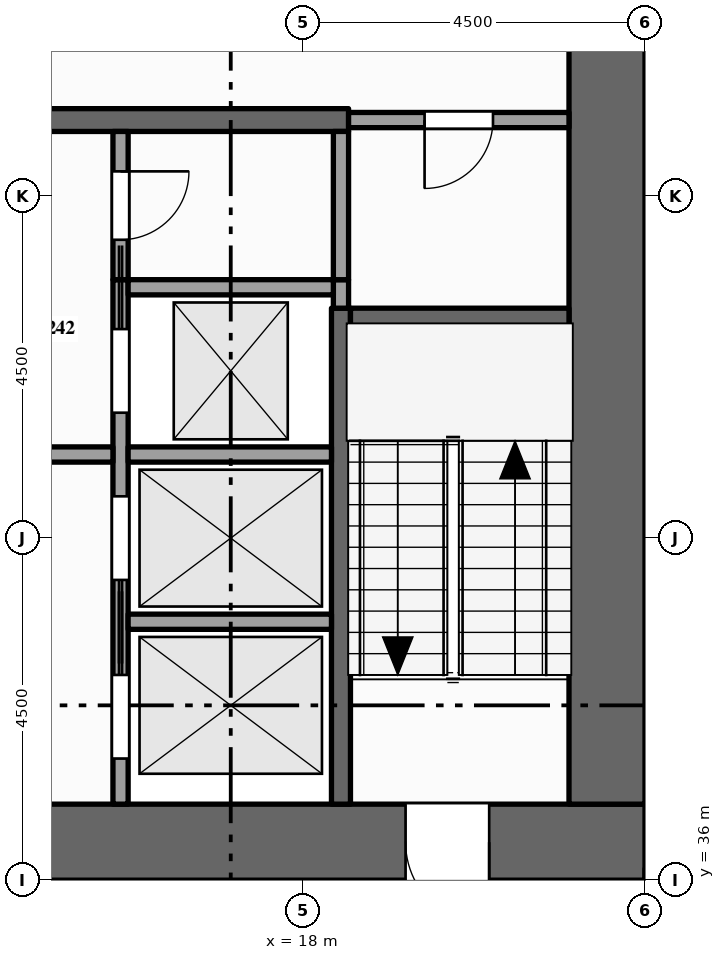
"""IFC4 building model, lengths in metres.
Left out: names, types, materials, properties, quantities, classifications, styles, units other than length and angle.
Written with IfcOpenShell. Run it as: python <this file> out.ifc"""

import sys

from ifc_helpers import new_model, si_unit, direction, frame, frame_2d, origin, place, context, subcontext, project, spatial, rectangle, extrude, element, fill, save


model = new_model("IFC4")
c1 = context("Model", 3, precision=1e-05, world=origin(), true_north=direction((0.0, 1.0)))
c2 = subcontext(c1, "Body", "Model", "MODEL_VIEW")
j1 = project(units=[si_unit("LENGTHUNIT", "METRE"), si_unit("PLANEANGLEUNIT", "RADIAN")], contexts=[c1])
p1 = place(None, origin())
s1 = spatial("IfcSite", under=j1, at=p1, CompositionType="ELEMENT")
p2 = place(p1, origin())
s2 = spatial("IfcBuilding", under=s1, at=p2, CompositionType="ELEMENT")
p3 = place(p2, frame((0.0, 0.0, 235.0)))
s3 = spatial("IfcBuildingStorey", under=s2, at=p3, CompositionType="ELEMENT", Elevation=235.0)
p4 = place(p3, frame((0.0, 36.5, -0.15), z_axis=(0.0, 0.0, 1.0), x_axis=(1.0, 0.0, 0.0)))
e1 = element("IfcWall", 1, at=p4, inside=s3, PredefinedType="SHEAR", context=c2, shape_type="SweptSolid", body=[
    extrude(rectangle(XDim=22.5, YDim=1.0, at=frame_2d((11.25, 0.0))), origin(), (0.0, 0.0, 1.0), 4.0),
])
p5 = place(p4, frame((7.1, 0.0, 0.15)))
e2 = element("IfcOpeningElement", 2, at=p5, cuts=e1, PredefinedType="OPENING", context=c2, shape_type="SweptSolid", body=[
    extrude(rectangle(XDim=1.8, YDim=2.1, at=frame_2d((0.9, 1.05))), frame((0.0, 0.51, 0.0), z_axis=(0.0, -1.0, 0.0), x_axis=(1.0, 0.0, 0.0)), (0.0, 0.0, 1.0), 1.02),
])
p6 = place(p4, frame((13.15, 0.0, 0.15)))
e3 = element("IfcOpeningElement", 3, at=p6, cuts=e1, PredefinedType="OPENING", context=c2, shape_type="SweptSolid", body=[
    extrude(rectangle(XDim=1.1, YDim=2.1, at=frame_2d((0.55, 1.05))), frame((0.0, 0.51, 0.0), z_axis=(0.0, -1.0, 0.0), x_axis=(1.0, 0.0, 0.0)), (0.0, 0.0, 1.0), 1.02),
])
p7 = place(p4, frame((2.15, 0.0, 0.15)))
e4 = element("IfcOpeningElement", 4, at=p7, cuts=e1, PredefinedType="OPENING", context=c2, shape_type="SweptSolid", body=[
    extrude(rectangle(XDim=1.1, YDim=2.1, at=frame_2d((0.55, 1.05))), frame((0.0, 0.51, 0.0), z_axis=(0.0, -1.0, 0.0), x_axis=(1.0, 0.0, 0.0)), (0.0, 0.0, 1.0), 1.02),
])
p8 = place(p4, frame((19.35, 0.0, 0.15)))
e5 = element("IfcOpeningElement", 5, at=p8, cuts=e1, PredefinedType="OPENING", context=c2, shape_type="SweptSolid", body=[
    extrude(rectangle(XDim=1.1, YDim=2.1, at=frame_2d((0.55, 1.05))), frame((0.0, 0.51, 0.0), z_axis=(0.0, -1.0, 0.0), x_axis=(1.0, 0.0, 0.0)), (0.0, 0.0, 1.0), 1.02),
])
p9 = place(p3, frame((22.0, 37.0, -0.15), z_axis=(0.0, 0.0, 1.0), x_axis=(0.0, 1.0, 0.0)))
e6 = element("IfcWall", 6, at=p9, inside=s3, PredefinedType="SHEAR", context=c2, shape_type="SweptSolid", body=[
    extrude(rectangle(XDim=11.5, YDim=1.0, at=frame_2d((5.75, 0.0))), origin(), (0.0, 0.0, 1.0), 4.0),
])
p10 = place(p3, frame((15.6, 37.0, 0.0), z_axis=(0.0, 0.0, 1.0), x_axis=(0.0, 1.0, 0.0)))
e7 = element("IfcWall", 7, at=p10, inside=s3, PredefinedType="SOLIDWALL", context=c2, shape_type="SweptSolid", body=[
    extrude(rectangle(XDim=6.9, YDim=0.2, at=frame_2d((3.45, 0.0))), origin(), (0.0, 0.0, 1.0), 3.85),
])
p11 = place(p10, frame((0.6, 0.0, 0.012)))
e8 = element("IfcOpeningElement", 8, at=p11, cuts=e7, PredefinedType="OPENING", context=c2, shape_type="SweptSolid", body=[
    extrude(rectangle(XDim=1.1, YDim=2.1, at=frame_2d((0.55, 1.05))), frame((0.0, 0.11, 0.0), z_axis=(0.0, -1.0, 0.0), x_axis=(1.0, 0.0, 0.0)), (0.0, 0.0, 1.0), 0.22),
])
p12 = place(p10, frame((2.95, 0.0, 0.012)))
e9 = element("IfcOpeningElement", 9, at=p12, cuts=e7, PredefinedType="OPENING", context=c2, shape_type="SweptSolid", body=[
    extrude(rectangle(XDim=1.1, YDim=2.1, at=frame_2d((0.55, 1.05))), frame((0.0, 0.11, 0.0), z_axis=(0.0, -1.0, 0.0), x_axis=(1.0, 0.0, 0.0)), (0.0, 0.0, 1.0), 0.22),
])
p13 = place(p10, frame((5.15, 0.0, 0.012)))
e10 = element("IfcOpeningElement", 10, at=p13, cuts=e7, PredefinedType="OPENING", context=c2, shape_type="SweptSolid", body=[
    extrude(rectangle(XDim=1.1, YDim=2.1, at=frame_2d((0.55, 1.05))), frame((0.0, 0.11, 0.0), z_axis=(0.0, -1.0, 0.0), x_axis=(1.0, 0.0, 0.0)), (0.0, 0.0, 1.0), 0.22),
])
p14 = place(p3, frame((15.6, 43.9, 0.0), z_axis=(0.0, 0.0, 1.0), x_axis=(0.0, 1.0, 0.0)))
e11 = element("IfcWall", 11, at=p14, inside=s3, PredefinedType="PARTITIONING", context=c2, shape_type="SweptSolid", body=[
    extrude(rectangle(XDim=1.95, YDim=0.2, at=frame_2d((0.975, 0.0))), origin(), (0.0, 0.0, 1.0), 3.85),
])
p15 = place(p14, frame((0.525, 0.0, 0.0)))
e12 = element("IfcOpeningElement", 12, at=p15, cuts=e11, PredefinedType="OPENING", context=c2, shape_type="SweptSolid", body=[
    extrude(rectangle(XDim=0.9, YDim=2.1, at=frame_2d((0.45, 1.05))), frame((0.0, 0.11, 0.0), z_axis=(0.0, -1.0, 0.0), x_axis=(1.0, 0.0, 0.0)), (0.0, 0.0, 1.0), 0.22),
])
p16 = place(p3, frame((18.5, 37.0, 0.0), z_axis=(0.0, 0.0, 1.0), x_axis=(0.0, 1.0, 0.0)))
e13 = element("IfcWall", 13, at=p16, inside=s3, PredefinedType="SHEAR", context=c2, shape_type="SweptSolid", body=[
    extrude(rectangle(XDim=6.525, YDim=0.25, at=frame_2d((3.262, 0.0))), origin(), (0.0, 0.0, 1.0), 3.85),
])
p17 = place(p3, frame((18.5, 43.525, 0.0), z_axis=(0.0, 0.0, 1.0), x_axis=(0.0, 1.0, 0.0)))
e14 = element("IfcWall", 14, at=p17, inside=s3, PredefinedType="SOLIDWALL", context=c2, shape_type="SweptSolid", body=[
    extrude(rectangle(XDim=0.375, YDim=0.2, at=frame_2d((0.188, 0.0))), origin(), (0.0, 0.0, 1.0), 3.85),
])
p18 = place(p3, frame((18.5, 43.9, 0.0), z_axis=(0.0, 0.0, 1.0), x_axis=(0.0, 1.0, 0.0)))
e15 = element("IfcWall", 15, at=p18, inside=s3, PredefinedType="PARTITIONING", context=c2, shape_type="SweptSolid", body=[
    extrude(rectangle(XDim=1.95, YDim=0.2, at=frame_2d((0.975, 0.0))), origin(), (0.0, 0.0, 1.0), 3.85),
])
p19 = place(p3, frame((15.7, 39.4, 0.0), z_axis=(0.0, 0.0, 1.0), x_axis=(1.0, 0.0, 0.0)))
e16 = element("IfcWall", 16, at=p19, inside=s3, PredefinedType="SOLIDWALL", context=c2, shape_type="SweptSolid", body=[
    extrude(rectangle(XDim=2.675, YDim=0.2, at=frame_2d((1.337, 0.0))), origin(), (0.0, 0.0, 1.0), 3.85),
])
p20 = place(p3, frame((11.9, 41.6, 0.0), z_axis=(0.0, 0.0, 1.0), x_axis=(1.0, 0.0, 0.0)))
e17 = element("IfcWall", 17, at=p20, inside=s3, PredefinedType="PARTITIONING", context=c2, shape_type="SweptSolid", body=[
    extrude(rectangle(XDim=3.6, YDim=0.2, at=frame_2d((1.8, 0.0))), origin(), (0.0, 0.0, 1.0), 3.85),
])
p21 = place(p20, frame((1.3, 0.0, 0.0)))
e18 = element("IfcOpeningElement", 18, at=p21, cuts=e17, PredefinedType="OPENING", context=c2, shape_type="SweptSolid", body=[
    extrude(rectangle(XDim=1.0, YDim=2.1, at=frame_2d((0.5, 1.05))), frame((0.0, 0.11, 0.0), z_axis=(0.0, -1.0, 0.0), x_axis=(1.0, 0.0, 0.0)), (0.0, 0.0, 1.0), 0.22),
])
p22 = place(p3, frame((15.7, 41.6, 0.0), z_axis=(0.0, 0.0, 1.0), x_axis=(1.0, 0.0, 0.0)))
e19 = element("IfcWall", 19, at=p22, inside=s3, PredefinedType="SOLIDWALL", context=c2, shape_type="SweptSolid", body=[
    extrude(rectangle(XDim=2.675, YDim=0.2, at=frame_2d((1.337, 0.0))), origin(), (0.0, 0.0, 1.0), 3.85),
])
p23 = place(p3, frame((18.625, 43.4, 0.0), z_axis=(0.0, 0.0, 1.0), x_axis=(1.0, 0.0, 0.0)))
e20 = element("IfcWall", 20, at=p23, inside=s3, PredefinedType="SHEAR", context=c2, shape_type="SweptSolid", body=[
    extrude(rectangle(XDim=2.875, YDim=0.25, at=frame_2d((1.438, 0.0))), origin(), (0.0, 0.0, 1.0), 3.85),
])
p24 = place(p3, frame((15.7, 43.8, 0.0), z_axis=(0.0, 0.0, 1.0), x_axis=(1.0, 0.0, 0.0)))
e21 = element("IfcWall", 21, at=p24, inside=s3, PredefinedType="SOLIDWALL", context=c2, shape_type="SweptSolid", body=[
    extrude(rectangle(XDim=2.7, YDim=0.2, at=frame_2d((1.35, 0.0))), origin(), (0.0, 0.0, 1.0), 3.85),
])
p25 = place(p3, frame((4.1, 46.0, 0.0), z_axis=(0.0, 0.0, 1.0), x_axis=(1.0, 0.0, 0.0)))
e22 = element("IfcWall", 22, at=p25, inside=s3, PredefinedType="SHEAR", context=c2, shape_type="SweptSolid", body=[
    extrude(rectangle(XDim=14.5, YDim=0.3, at=frame_2d((7.25, 0.0))), origin(), (0.0, 0.0, 1.0), 3.85),
])
p26 = place(p25, frame((3.4, 0.0, 0.0)))
e23 = element("IfcOpeningElement", 23, at=p26, cuts=e22, PredefinedType="OPENING", context=c2, shape_type="SweptSolid", body=[
    extrude(rectangle(XDim=1.0, YDim=2.1, at=frame_2d((0.5, 1.05))), frame((0.0, 0.16, 0.0), z_axis=(0.0, -1.0, 0.0), x_axis=(1.0, 0.0, 0.0)), (0.0, 0.0, 1.0), 0.32),
])
p27 = place(p25, frame((9.1, 0.0, 0.0)))
e24 = element("IfcOpeningElement", 24, at=p27, cuts=e22, PredefinedType="OPENING", context=c2, shape_type="SweptSolid", body=[
    extrude(rectangle(XDim=1.0, YDim=2.1, at=frame_2d((0.5, 1.05))), frame((0.0, 0.16, 0.0), z_axis=(0.0, -1.0, 0.0), x_axis=(1.0, 0.0, 0.0)), (0.0, 0.0, 1.0), 0.32),
])
p28 = place(p3, frame((18.6, 46.0, 0.0), z_axis=(0.0, 0.0, 1.0), x_axis=(1.0, 0.0, 0.0)))
e25 = element("IfcWall", 25, at=p28, inside=s3, PredefinedType="PARTITIONING", context=c2, shape_type="SweptSolid", body=[
    extrude(rectangle(XDim=2.9, YDim=0.2, at=frame_2d((1.45, 0.0))), origin(), (0.0, 0.0, 1.0), 3.85),
])
p29 = place(p28, frame((1.0, 0.0, 0.0)))
e26 = element("IfcOpeningElement", 26, at=p29, cuts=e25, PredefinedType="OPENING", context=c2, shape_type="SweptSolid", body=[
    extrude(rectangle(XDim=0.9, YDim=2.1, at=frame_2d((0.45, 1.05))), frame((0.0, 0.11, 0.0), z_axis=(0.0, -1.0, 0.0), x_axis=(1.0, 0.0, 0.0)), (0.0, 0.0, 1.0), 0.22),
])
p30 = place(p11, origin())
e27 = element("IfcDoor", 27, at=p30, inside=s3, OperationType="SLIDING_TO_RIGHT", PredefinedType="DOOR", context=c2, shape_type="SweptSolid", body=[
    extrude(rectangle(XDim=1.1, YDim=2.1, at=frame_2d((0.55, 1.05))), frame((0.0, 0.025, 0.0), z_axis=(0.0, -1.0, 0.0), x_axis=(1.0, 0.0, 0.0)), (0.0, 0.0, 1.0), 0.05),
])
fill(e8, e27)
p31 = place(p12, origin())
e28 = element("IfcDoor", 28, at=p31, inside=s3, OperationType="SLIDING_TO_LEFT", PredefinedType="DOOR", context=c2, shape_type="SweptSolid", body=[
    extrude(rectangle(XDim=1.1, YDim=2.1, at=frame_2d((0.55, 1.05))), frame((0.0, 0.025, 0.0), z_axis=(0.0, -1.0, 0.0), x_axis=(1.0, 0.0, 0.0)), (0.0, 0.0, 1.0), 0.05),
])
fill(e9, e28)
p32 = place(p13, origin())
e29 = element("IfcDoor", 29, at=p32, inside=s3, OperationType="SLIDING_TO_RIGHT", PredefinedType="DOOR", context=c2, shape_type="SweptSolid", body=[
    extrude(rectangle(XDim=1.1, YDim=2.1, at=frame_2d((0.55, 1.05))), frame((0.0, 0.025, 0.0), z_axis=(0.0, -1.0, 0.0), x_axis=(1.0, 0.0, 0.0)), (0.0, 0.0, 1.0), 0.05),
])
fill(e10, e29)
p33 = place(p8, origin())
e30 = element("IfcDoor", 30, at=p33, inside=s3, OperationType="SINGLE_SWING_RIGHT", PredefinedType="DOOR", context=c2, shape_type="SweptSolid", body=[
    extrude(rectangle(XDim=1.1, YDim=2.1, at=frame_2d((0.55, 1.05))), frame((0.0, 0.025, 0.0), z_axis=(0.0, -1.0, 0.0), x_axis=(1.0, 0.0, 0.0)), (0.0, 0.0, 1.0), 0.05),
])
fill(e5, e30)
p34 = place(p29, origin())
e31 = element("IfcDoor", 31, at=p34, inside=s3, OperationType="SINGLE_SWING_LEFT", PredefinedType="DOOR", context=c2, shape_type="SweptSolid", body=[
    extrude(rectangle(XDim=0.9, YDim=2.1, at=frame_2d((0.45, 1.05))), frame((0.0, 0.025, 0.0), z_axis=(0.0, -1.0, 0.0), x_axis=(1.0, 0.0, 0.0)), (0.0, 0.0, 1.0), 0.05),
])
fill(e26, e31)
p35 = place(p15, origin())
e32 = element("IfcDoor", 32, at=p35, inside=s3, OperationType="SINGLE_SWING_RIGHT", PredefinedType="DOOR", context=c2, shape_type="SweptSolid", body=[
    extrude(rectangle(XDim=0.9, YDim=2.1, at=frame_2d((0.45, 1.05))), frame((0.0, 0.025, 0.0), z_axis=(0.0, -1.0, 0.0), x_axis=(1.0, 0.0, 0.0)), (0.0, 0.0, 1.0), 0.05),
])
fill(e12, e32)
save(model, sys.argv[1])
